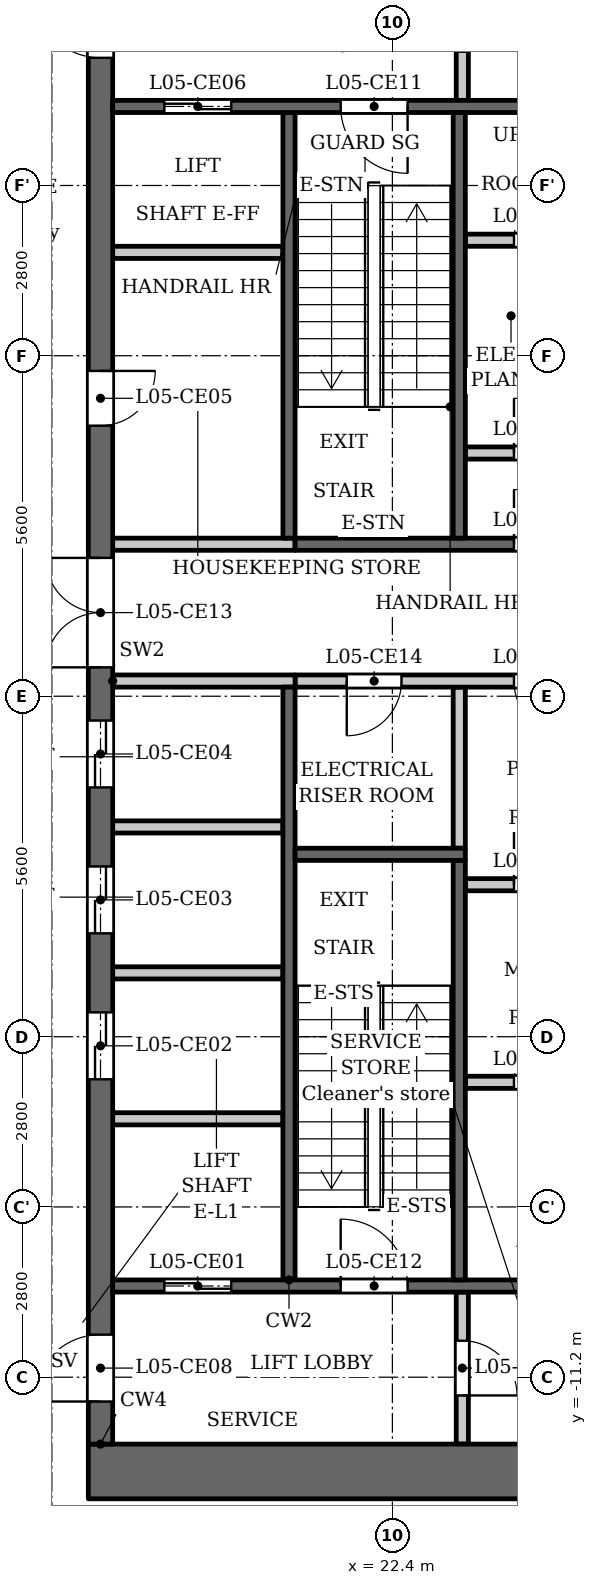
"""IFC4 building model, lengths in metres.
Left out: names, types, materials, properties, quantities, classifications, styles, units other than length and angle.
Written with IfcOpenShell. Run it as: python <this file> out.ifc"""

import sys

from ifc_helpers import new_model, si_unit, direction, frame, frame_2d, origin, place, context, subcontext, project, spatial, rectangle, extrude, element, fill, save


model = new_model("IFC4")
c1 = context("Model", 3, precision=1e-05, world=origin(), true_north=direction((0.0, 1.0)))
c2 = subcontext(c1, "Body", "Model", "MODEL_VIEW")
j1 = project(units=[si_unit("LENGTHUNIT", "METRE"), si_unit("PLANEANGLEUNIT", "RADIAN")], contexts=[c1])
p1 = place(None, origin())
s1 = spatial("IfcSite", under=j1, at=p1, CompositionType="ELEMENT")
p2 = place(p1, origin())
s2 = spatial("IfcBuilding", under=s1, at=p2, CompositionType="ELEMENT")
p3 = place(p2, frame((0.0, 0.0, 25.7)))
s3 = spatial("IfcBuildingStorey", under=s2, at=p3, CompositionType="ELEMENT", Elevation=25.7)
p4 = place(p3, frame((23.5, -2.5, 0.0), z_axis=(0.0, 0.0, 1.0), x_axis=(0.0, 1.0, 0.0)))
e1 = element("IfcWall", 1, at=p4, inside=s3, PredefinedType="PARTITIONING", context=c2, shape_type="SweptSolid", body=[
    extrude(rectangle(XDim=2.65, YDim=0.2, at=frame_2d((1.325, 0.0))), origin(), (0.0, 0.0, 1.0), 4.45),
])
p5 = place(p3, frame((20.7, 2.6, 0.0), z_axis=(0.0, 0.0, 1.0), x_axis=(0.0, 1.0, 0.0)))
e2 = element("IfcWall", 2, at=p5, inside=s3, PredefinedType="SHEAR", context=c2, shape_type="SweptSolid", body=[
    extrude(rectangle(XDim=7.0, YDim=0.2, at=frame_2d((3.5, 0.0))), origin(), (0.0, 0.0, 1.0), 4.45),
])
p6 = place(p3, frame((20.7, -9.6, 0.0), z_axis=(0.0, 0.0, 1.0), x_axis=(0.0, 1.0, 0.0)))
e3 = element("IfcWall", 3, at=p6, inside=s3, PredefinedType="SHEAR", context=c2, shape_type="SweptSolid", body=[
    extrude(rectangle(XDim=9.75, YDim=0.2, at=frame_2d((4.875, 0.0))), origin(), (0.0, 0.0, 1.0), 4.45),
])
p7 = place(p3, frame((20.8, 2.5, 0.0), z_axis=(0.0, 0.0, 1.0), x_axis=(1.0, 0.0, 0.0)))
e4 = element("IfcWall", 4, at=p7, inside=s3, PredefinedType="SHEAR", context=c2, shape_type="SweptSolid", body=[
    extrude(rectangle(XDim=5.3, YDim=0.2, at=frame_2d((2.65, 0.0))), origin(), (0.0, 0.0, 1.0), 4.45),
])
p8 = place(p7, frame((3.6, 0.0, 0.0)))
e5 = element("IfcOpeningElement", 5, at=p8, cuts=e4, PredefinedType="OPENING", context=c2, shape_type="SweptSolid", body=[
    extrude(rectangle(XDim=0.9, YDim=2.1, at=frame_2d((0.45, 1.05))), frame((0.0, 0.11, 0.0), z_axis=(0.0, -1.0, 0.0), x_axis=(1.0, 0.0, 0.0)), (0.0, 0.0, 1.0), 0.22),
])
p9 = place(p3, frame((20.8, 0.25, 0.0), z_axis=(0.0, 0.0, 1.0), x_axis=(1.0, 0.0, 0.0)))
e6 = element("IfcWall", 6, at=p9, inside=s3, PredefinedType="PARTITIONING", context=c2, shape_type="SweptSolid", body=[
    extrude(rectangle(XDim=5.3, YDim=0.2, at=frame_2d((2.65, 0.0))), origin(), (0.0, 0.0, 1.0), 4.45),
])
p10 = place(p9, frame((0.85, 0.0, 0.0)))
e7 = element("IfcOpeningElement", 7, at=p10, cuts=e6, PredefinedType="OPENING", context=c2, shape_type="SweptSolid", body=[
    extrude(rectangle(XDim=0.9, YDim=2.1, at=frame_2d((0.45, 1.05))), frame((0.0, 0.11, 0.0), z_axis=(0.0, -1.0, 0.0), x_axis=(1.0, 0.0, 0.0)), (0.0, 0.0, 1.0), 0.22),
])
p11 = place(p9, frame((3.6, 0.0, 0.0)))
e8 = element("IfcOpeningElement", 8, at=p11, cuts=e6, PredefinedType="OPENING", context=c2, shape_type="SweptSolid", body=[
    extrude(rectangle(XDim=0.9, YDim=2.1, at=frame_2d((0.45, 1.05))), frame((0.0, 0.11, 0.0), z_axis=(0.0, -1.0, 0.0), x_axis=(1.0, 0.0, 0.0)), (0.0, 0.0, 1.0), 0.22),
])
p12 = place(p3, frame((17.4, -12.75, 0.0), z_axis=(0.0, 0.0, 1.0), x_axis=(1.0, 0.0, 0.0)))
e9 = element("IfcWall", 9, at=p12, inside=s3, PredefinedType="SHEAR", context=c2, shape_type="SweptSolid", body=[
    extrude(rectangle(XDim=10.4, YDim=0.9, at=frame_2d((5.2, 0.0))), origin(), (0.0, 0.0, 1.0), 4.45),
])
p13 = place(p3, frame((17.6, -12.3, 0.0), z_axis=(0.0, 0.0, 1.0), x_axis=(0.0, 1.0, 0.0)))
e10 = element("IfcWall", 10, at=p13, inside=s3, PredefinedType="SHEAR", context=c2, shape_type="SweptSolid", body=[
    extrude(rectangle(XDim=24.6, YDim=0.4, at=frame_2d((12.3, 0.0))), origin(), (0.0, 0.0, 1.0), 4.45),
])
p14 = place(p13, frame((6.0, 0.0, 0.0)))
e11 = element("IfcOpeningElement", 11, at=p14, cuts=e10, PredefinedType="OPENING", context=c2, shape_type="SweptSolid", body=[
    extrude(rectangle(XDim=1.1, YDim=2.1, at=frame_2d((0.55, 1.05))), frame((0.0, 0.21, 0.0), z_axis=(0.0, -1.0, 0.0), x_axis=(1.0, 0.0, 0.0)), (0.0, 0.0, 1.0), 0.42),
])
p15 = place(p13, frame((8.4, 0.0, 0.0)))
e12 = element("IfcOpeningElement", 12, at=p15, cuts=e10, PredefinedType="OPENING", context=c2, shape_type="SweptSolid", body=[
    extrude(rectangle(XDim=1.1, YDim=2.1, at=frame_2d((0.55, 1.05))), frame((0.0, 0.21, 0.0), z_axis=(0.0, -1.0, 0.0), x_axis=(1.0, 0.0, 0.0)), (0.0, 0.0, 1.0), 0.42),
])
p16 = place(p13, frame((10.8, 0.0, 0.0)))
e13 = element("IfcOpeningElement", 13, at=p16, cuts=e10, PredefinedType="OPENING", context=c2, shape_type="SweptSolid", body=[
    extrude(rectangle(XDim=1.1, YDim=2.1, at=frame_2d((0.55, 1.05))), frame((0.0, 0.21, 0.0), z_axis=(0.0, -1.0, 0.0), x_axis=(1.0, 0.0, 0.0)), (0.0, 0.0, 1.0), 0.42),
])
p17 = place(p13, frame((16.75, 0.0, 0.0)))
e14 = element("IfcOpeningElement", 14, at=p17, cuts=e10, PredefinedType="OPENING", context=c2, shape_type="SweptSolid", body=[
    extrude(rectangle(XDim=0.9, YDim=2.1, at=frame_2d((0.45, 1.05))), frame((0.0, 0.21, 0.0), z_axis=(0.0, -1.0, 0.0), x_axis=(1.0, 0.0, 0.0)), (0.0, 0.0, 1.0), 0.42),
])
p18 = place(p13, frame((22.8, 0.0, 0.0)))
e15 = element("IfcOpeningElement", 15, at=p18, cuts=e10, PredefinedType="OPENING", context=c2, shape_type="SweptSolid", body=[
    extrude(rectangle(XDim=1.1, YDim=2.1, at=frame_2d((0.55, 1.05))), frame((0.0, 0.21, 0.0), z_axis=(0.0, -1.0, 0.0), x_axis=(1.0, 0.0, 0.0)), (0.0, 0.0, 1.0), 0.42),
])
p19 = place(p13, frame((0.7, 0.0, 0.0)))
e16 = element("IfcOpeningElement", 16, at=p19, cuts=e10, PredefinedType="OPENING", context=c2, shape_type="SweptSolid", body=[
    extrude(rectangle(XDim=1.1, YDim=2.1, at=frame_2d((0.55, 1.05))), frame((0.0, 0.21, 0.0), z_axis=(0.0, -1.0, 0.0), x_axis=(1.0, 0.0, 0.0)), (0.0, 0.0, 1.0), 0.42),
])
p20 = place(p13, frame((12.775, 0.0, 0.0)))
e17 = element("IfcOpeningElement", 17, at=p20, cuts=e10, PredefinedType="OPENING", context=c2, shape_type="SweptSolid", body=[
    extrude(rectangle(XDim=1.8, YDim=2.1, at=frame_2d((0.9, 1.05))), frame((0.0, 0.21, 0.0), z_axis=(0.0, -1.0, 0.0), x_axis=(1.0, 0.0, 0.0)), (0.0, 0.0, 1.0), 0.42),
])
p21 = place(p3, frame((23.55, 9.8, 0.0), z_axis=(0.0, 0.0, 1.0), x_axis=(0.0, 1.0, 0.0)))
e18 = element("IfcWall", 18, at=p21, inside=s3, PredefinedType="PARTITIONING", context=c2, shape_type="SweptSolid", body=[
    extrude(rectangle(XDim=2.5, YDim=0.2, at=frame_2d((1.25, 0.0))), origin(), (0.0, 0.0, 1.0), 4.45),
])
p22 = place(p21, frame((0.8, 0.0, 0.0)))
e19 = element("IfcOpeningElement", 19, at=p22, cuts=e18, PredefinedType="OPENING", context=c2, shape_type="SweptSolid", body=[
    extrude(rectangle(XDim=0.9, YDim=2.1, at=frame_2d((0.45, 1.05))), frame((0.0, 0.11, 0.0), z_axis=(0.0, -1.0, 0.0), x_axis=(1.0, 0.0, 0.0)), (0.0, 0.0, 1.0), 0.22),
])
p23 = place(p3, frame((23.55, -12.3, 0.0), z_axis=(0.0, 0.0, 1.0), x_axis=(0.0, 1.0, 0.0)))
e20 = element("IfcWall", 20, at=p23, inside=s3, PredefinedType="PARTITIONING", context=c2, shape_type="SweptSolid", body=[
    extrude(rectangle(XDim=2.5, YDim=0.2, at=frame_2d((1.25, 0.0))), origin(), (0.0, 0.0, 1.0), 4.45),
])
p24 = place(p23, frame((0.8, 0.0, 0.0)))
e21 = element("IfcOpeningElement", 21, at=p24, cuts=e20, PredefinedType="OPENING", context=c2, shape_type="SweptSolid", body=[
    extrude(rectangle(XDim=0.9, YDim=2.1, at=frame_2d((0.45, 1.05))), frame((0.0, 0.11, 0.0), z_axis=(0.0, -1.0, 0.0), x_axis=(1.0, 0.0, 0.0)), (0.0, 0.0, 1.0), 0.22),
])
p25 = place(p3, frame((23.6, -6.35, 0.0), z_axis=(0.0, 0.0, 1.0), x_axis=(1.0, 0.0, 0.0)))
e22 = element("IfcWall", 22, at=p25, inside=s3, PredefinedType="PARTITIONING", context=c2, shape_type="SweptSolid", body=[
    extrude(rectangle(XDim=2.5, YDim=0.2, at=frame_2d((1.25, 0.0))), origin(), (0.0, 0.0, 1.0), 4.45),
])
p26 = place(p25, frame((0.8, 0.0, 0.0)))
e23 = element("IfcOpeningElement", 23, at=p26, cuts=e22, PredefinedType="OPENING", context=c2, shape_type="SweptSolid", body=[
    extrude(rectangle(XDim=0.9, YDim=2.1, at=frame_2d((0.45, 1.05))), frame((0.0, 0.11, 0.0), z_axis=(0.0, -1.0, 0.0), x_axis=(1.0, 0.0, 0.0)), (0.0, 0.0, 1.0), 0.22),
])
p27 = place(p3, frame((23.6, -3.1, 0.0), z_axis=(0.0, 0.0, 1.0), x_axis=(1.0, 0.0, 0.0)))
e24 = element("IfcWall", 24, at=p27, inside=s3, PredefinedType="PARTITIONING", context=c2, shape_type="SweptSolid", body=[
    extrude(rectangle(XDim=2.5, YDim=0.2, at=frame_2d((1.25, 0.0))), origin(), (0.0, 0.0, 1.0), 4.45),
])
p28 = place(p27, frame((0.8, 0.0, 0.0)))
e25 = element("IfcOpeningElement", 25, at=p28, cuts=e24, PredefinedType="OPENING", context=c2, shape_type="SweptSolid", body=[
    extrude(rectangle(XDim=0.9, YDim=2.1, at=frame_2d((0.45, 1.05))), frame((0.0, 0.11, 0.0), z_axis=(0.0, -1.0, 0.0), x_axis=(1.0, 0.0, 0.0)), (0.0, 0.0, 1.0), 0.22),
])
p29 = place(p3, frame((23.6, 4.0, 0.0), z_axis=(0.0, 0.0, 1.0), x_axis=(1.0, 0.0, 0.0)))
e26 = element("IfcWall", 26, at=p29, inside=s3, PredefinedType="PARTITIONING", context=c2, shape_type="SweptSolid", body=[
    extrude(rectangle(XDim=2.5, YDim=0.2, at=frame_2d((1.25, 0.0))), origin(), (0.0, 0.0, 1.0), 4.45),
])
p30 = place(p29, frame((0.8, 0.0, 0.0)))
e27 = element("IfcOpeningElement", 27, at=p30, cuts=e26, PredefinedType="OPENING", context=c2, shape_type="SweptSolid", body=[
    extrude(rectangle(XDim=0.9, YDim=2.1, at=frame_2d((0.45, 1.05))), frame((0.0, 0.11, 0.0), z_axis=(0.0, -1.0, 0.0), x_axis=(1.0, 0.0, 0.0)), (0.0, 0.0, 1.0), 0.22),
])
p31 = place(p3, frame((23.6, 7.5, 0.0), z_axis=(0.0, 0.0, 1.0), x_axis=(1.0, 0.0, 0.0)))
e28 = element("IfcWall", 28, at=p31, inside=s3, PredefinedType="PARTITIONING", context=c2, shape_type="SweptSolid", body=[
    extrude(rectangle(XDim=2.5, YDim=0.2, at=frame_2d((1.25, 0.0))), origin(), (0.0, 0.0, 1.0), 4.45),
])
p32 = place(p31, frame((0.8, 0.0, 0.0)))
e29 = element("IfcOpeningElement", 29, at=p32, cuts=e28, PredefinedType="OPENING", context=c2, shape_type="SweptSolid", body=[
    extrude(rectangle(XDim=0.9, YDim=2.1, at=frame_2d((0.45, 1.05))), frame((0.0, 0.11, 0.0), z_axis=(0.0, -1.0, 0.0), x_axis=(1.0, 0.0, 0.0)), (0.0, 0.0, 1.0), 0.22),
])
p33 = place(p3, frame((17.8, -9.7, 0.0), z_axis=(0.0, 0.0, 1.0), x_axis=(1.0, 0.0, 0.0)))
e30 = element("IfcWall", 30, at=p33, inside=s3, PredefinedType="SHEAR", context=c2, shape_type="SweptSolid", body=[
    extrude(rectangle(XDim=8.3, YDim=0.2, at=frame_2d((4.15, 0.0))), origin(), (0.0, 0.0, 1.0), 4.45),
])
p34 = place(p33, frame((0.85, 0.0, 0.0)))
e31 = element("IfcOpeningElement", 31, at=p34, cuts=e30, PredefinedType="OPENING", context=c2, shape_type="SweptSolid", body=[
    extrude(rectangle(XDim=1.1, YDim=2.1, at=frame_2d((0.55, 1.05))), frame((0.0, 0.11, 0.0), z_axis=(0.0, -1.0, 0.0), x_axis=(1.0, 0.0, 0.0)), (0.0, 0.0, 1.0), 0.22),
])
p35 = place(p33, frame((3.75, 0.0, 0.0)))
e32 = element("IfcOpeningElement", 32, at=p35, cuts=e30, PredefinedType="OPENING", context=c2, shape_type="SweptSolid", body=[
    extrude(rectangle(XDim=1.1, YDim=2.1, at=frame_2d((0.55, 1.05))), frame((0.0, 0.11, 0.0), z_axis=(0.0, -1.0, 0.0), x_axis=(1.0, 0.0, 0.0)), (0.0, 0.0, 1.0), 0.22),
])
for number, where, z_axis, x_axis in (
    (33, (17.8, -6.95, 0.0), (0.0, 0.0, 1.0), (1.0, 0.0, 0.0)),
    (34, (17.8, -4.55, 0.0), (0.0, 0.0, 1.0), (1.0, 0.0, 0.0)),
    (35, (17.8, -2.15, 0.0), (0.0, 0.0, 1.0), (1.0, 0.0, 0.0)),
):
    element("IfcWall", number, at=place(p3, frame(where, z_axis=z_axis, x_axis=x_axis)), inside=s3, PredefinedType="PARTITIONING", context=c2, shape_type="SweptSolid", body=[
        extrude(rectangle(XDim=2.8, YDim=0.2, at=frame_2d((1.4, 0.0))), origin(), (0.0, 0.0, 1.0), 4.45),
    ])
for number, where, z_axis, x_axis in (
    (36, (17.8, 0.25, 0.0), (0.0, 0.0, 1.0), (1.0, 0.0, 0.0)),
    (37, (17.8, 2.5, 0.0), (0.0, 0.0, 1.0), (1.0, 0.0, 0.0)),
):
    element("IfcWall", number, at=place(p3, frame(where, z_axis=z_axis, x_axis=x_axis)), inside=s3, PredefinedType="PARTITIONING", context=c2, shape_type="SweptSolid", body=[
        extrude(rectangle(XDim=3.0, YDim=0.2, at=frame_2d((1.5, 0.0))), origin(), (0.0, 0.0, 1.0), 4.45),
    ])
p36 = place(p3, frame((17.8, 7.3, 0.0), z_axis=(0.0, 0.0, 1.0), x_axis=(1.0, 0.0, 0.0)))
e38 = element("IfcWall", 38, at=p36, inside=s3, PredefinedType="PARTITIONING", context=c2, shape_type="SweptSolid", body=[
    extrude(rectangle(XDim=2.8, YDim=0.2, at=frame_2d((1.4, 0.0))), origin(), (0.0, 0.0, 1.0), 4.45),
])
p37 = place(p3, frame((17.8, 9.7, 0.0), z_axis=(0.0, 0.0, 1.0), x_axis=(1.0, 0.0, 0.0)))
e39 = element("IfcWall", 39, at=p37, inside=s3, PredefinedType="SHEAR", context=c2, shape_type="SweptSolid", body=[
    extrude(rectangle(XDim=8.3, YDim=0.2, at=frame_2d((4.15, 0.0))), origin(), (0.0, 0.0, 1.0), 4.45),
])
p38 = place(p37, frame((0.85, 0.0, 0.0)))
e40 = element("IfcOpeningElement", 40, at=p38, cuts=e39, PredefinedType="OPENING", context=c2, shape_type="SweptSolid", body=[
    extrude(rectangle(XDim=1.1, YDim=2.1, at=frame_2d((0.55, 1.05))), frame((0.0, 0.11, 0.0), z_axis=(0.0, -1.0, 0.0), x_axis=(1.0, 0.0, 0.0)), (0.0, 0.0, 1.0), 0.22),
])
p39 = place(p37, frame((3.75, 0.0, 0.0)))
e41 = element("IfcOpeningElement", 41, at=p39, cuts=e39, PredefinedType="OPENING", context=c2, shape_type="SweptSolid", body=[
    extrude(rectangle(XDim=1.1, YDim=2.1, at=frame_2d((0.55, 1.05))), frame((0.0, 0.11, 0.0), z_axis=(0.0, -1.0, 0.0), x_axis=(1.0, 0.0, 0.0)), (0.0, 0.0, 1.0), 0.22),
])
p40 = place(p3, frame((23.5, 2.6, 0.0), z_axis=(0.0, 0.0, 1.0), x_axis=(0.0, 1.0, 0.0)))
e42 = element("IfcWall", 42, at=p40, inside=s3, PredefinedType="SHEAR", context=c2, shape_type="SweptSolid", body=[
    extrude(rectangle(XDim=7.0, YDim=0.2, at=frame_2d((3.5, 0.0))), origin(), (0.0, 0.0, 1.0), 4.45),
])
p41 = place(p3, frame((23.5, -9.6, 0.0), z_axis=(0.0, 0.0, 1.0), x_axis=(0.0, 1.0, 0.0)))
e43 = element("IfcWall", 43, at=p41, inside=s3, PredefinedType="SHEAR", context=c2, shape_type="SweptSolid", body=[
    extrude(rectangle(XDim=6.9, YDim=0.2, at=frame_2d((3.45, 0.0))), origin(), (0.0, 0.0, 1.0), 4.45),
])
p42 = place(p3, frame((20.8, -2.6, 0.0), z_axis=(0.0, 0.0, 1.0), x_axis=(1.0, 0.0, 0.0)))
e44 = element("IfcWall", 44, at=p42, inside=s3, PredefinedType="SHEAR", context=c2, shape_type="SweptSolid", body=[
    extrude(rectangle(XDim=2.8, YDim=0.2, at=frame_2d((1.4, 0.0))), origin(), (0.0, 0.0, 1.0), 4.45),
])
p43 = place(p34, origin())
e45 = element("IfcDoor", 45, at=p43, inside=s3, OperationType="DOUBLE_DOOR_SLIDING", PredefinedType="DOOR", context=c2, shape_type="SweptSolid", body=[
    extrude(rectangle(XDim=1.1, YDim=2.1, at=frame_2d((0.55, 1.05))), frame((0.0, 0.025, 0.0), z_axis=(0.0, -1.0, 0.0), x_axis=(1.0, 0.0, 0.0)), (0.0, 0.0, 1.0), 0.05),
])
fill(e31, e45)
p44 = place(p14, origin())
e46 = element("IfcDoor", 46, at=p44, inside=s3, OperationType="DOUBLE_DOOR_SLIDING", PredefinedType="DOOR", context=c2, shape_type="SweptSolid", body=[
    extrude(rectangle(XDim=1.1, YDim=2.1, at=frame_2d((0.55, 1.05))), frame((0.0, 0.025, 0.0), z_axis=(0.0, -1.0, 0.0), x_axis=(1.0, 0.0, 0.0)), (0.0, 0.0, 1.0), 0.05),
])
fill(e11, e46)
p45 = place(p15, origin())
e47 = element("IfcDoor", 47, at=p45, inside=s3, OperationType="DOUBLE_DOOR_SLIDING", PredefinedType="DOOR", context=c2, shape_type="SweptSolid", body=[
    extrude(rectangle(XDim=1.1, YDim=2.1, at=frame_2d((0.55, 1.05))), frame((0.0, 0.025, 0.0), z_axis=(0.0, -1.0, 0.0), x_axis=(1.0, 0.0, 0.0)), (0.0, 0.0, 1.0), 0.05),
])
fill(e12, e47)
p46 = place(p16, origin())
e48 = element("IfcDoor", 48, at=p46, inside=s3, OperationType="DOUBLE_DOOR_SLIDING", PredefinedType="DOOR", context=c2, shape_type="SweptSolid", body=[
    extrude(rectangle(XDim=1.1, YDim=2.1, at=frame_2d((0.55, 1.05))), frame((0.0, 0.025, 0.0), z_axis=(0.0, -1.0, 0.0), x_axis=(1.0, 0.0, 0.0)), (0.0, 0.0, 1.0), 0.05),
])
fill(e13, e48)
p47 = place(p17, origin())
e49 = element("IfcDoor", 49, at=p47, inside=s3, OperationType="SINGLE_SWING_RIGHT", PredefinedType="DOOR", context=c2, shape_type="SweptSolid", body=[
    extrude(rectangle(XDim=0.9, YDim=2.1, at=frame_2d((0.45, 1.05))), frame((0.0, 0.025, 0.0), z_axis=(0.0, -1.0, 0.0), x_axis=(1.0, 0.0, 0.0)), (0.0, 0.0, 1.0), 0.05),
])
fill(e14, e49)
p48 = place(p38, origin())
e50 = element("IfcDoor", 50, at=p48, inside=s3, OperationType="DOUBLE_DOOR_SLIDING", PredefinedType="DOOR", context=c2, shape_type="SweptSolid", body=[
    extrude(rectangle(XDim=1.1, YDim=2.1, at=frame_2d((0.55, 1.05))), frame((0.0, 0.025, 0.0), z_axis=(0.0, -1.0, 0.0), x_axis=(1.0, 0.0, 0.0)), (0.0, 0.0, 1.0), 0.05),
])
fill(e40, e50)
p49 = place(p18, origin())
e51 = element("IfcDoor", 51, at=p49, inside=s3, OperationType="SINGLE_SWING_LEFT", PredefinedType="DOOR", context=c2, shape_type="SweptSolid", body=[
    extrude(rectangle(XDim=1.1, YDim=2.1, at=frame_2d((0.55, 1.05))), frame((0.0, 0.025, 0.0), z_axis=(0.0, -1.0, 0.0), x_axis=(1.0, 0.0, 0.0)), (0.0, 0.0, 1.0), 0.05),
])
fill(e15, e51)
p50 = place(p19, origin())
e52 = element("IfcDoor", 52, at=p50, inside=s3, OperationType="SINGLE_SWING_RIGHT", PredefinedType="DOOR", context=c2, shape_type="SweptSolid", body=[
    extrude(rectangle(XDim=1.1, YDim=2.1, at=frame_2d((0.55, 1.05))), frame((0.0, 0.025, 0.0), z_axis=(0.0, -1.0, 0.0), x_axis=(1.0, 0.0, 0.0)), (0.0, 0.0, 1.0), 0.05),
])
fill(e16, e52)
p51 = place(p24, origin())
e53 = element("IfcDoor", 53, at=p51, inside=s3, OperationType="SINGLE_SWING_LEFT", PredefinedType="DOOR", context=c2, shape_type="SweptSolid", body=[
    extrude(rectangle(XDim=0.9, YDim=2.1, at=frame_2d((0.45, 1.05))), frame((0.0, 0.025, 0.0), z_axis=(0.0, -1.0, 0.0), x_axis=(1.0, 0.0, 0.0)), (0.0, 0.0, 1.0), 0.05),
])
fill(e21, e53)
p52 = place(p39, origin())
e54 = element("IfcDoor", 54, at=p52, inside=s3, OperationType="SINGLE_SWING_RIGHT", PredefinedType="DOOR", context=c2, shape_type="SweptSolid", body=[
    extrude(rectangle(XDim=1.1, YDim=2.1, at=frame_2d((0.55, 1.05))), frame((0.0, 0.025, 0.0), z_axis=(0.0, -1.0, 0.0), x_axis=(1.0, 0.0, 0.0)), (0.0, 0.0, 1.0), 0.05),
])
fill(e41, e54)
p53 = place(p35, origin())
e55 = element("IfcDoor", 55, at=p53, inside=s3, OperationType="SINGLE_SWING_RIGHT", PredefinedType="DOOR", context=c2, shape_type="SweptSolid", body=[
    extrude(rectangle(XDim=1.1, YDim=2.1, at=frame_2d((0.55, 1.05))), frame((0.0, 0.025, 0.0), z_axis=(0.0, -1.0, 0.0), x_axis=(1.0, 0.0, 0.0)), (0.0, 0.0, 1.0), 0.05),
])
fill(e32, e55)
p54 = place(p20, origin())
e56 = element("IfcDoor", 56, at=p54, inside=s3, OperationType="DOUBLE_DOOR_SINGLE_SWING", PredefinedType="DOOR", context=c2, shape_type="SweptSolid", body=[
    extrude(rectangle(XDim=1.8, YDim=2.1, at=frame_2d((0.9, 1.05))), frame((0.0, 0.025, 0.0), z_axis=(0.0, -1.0, 0.0), x_axis=(1.0, 0.0, 0.0)), (0.0, 0.0, 1.0), 0.05),
])
fill(e17, e56)
p55 = place(p10, origin())
e57 = element("IfcDoor", 57, at=p55, inside=s3, OperationType="SINGLE_SWING_LEFT", PredefinedType="DOOR", context=c2, shape_type="SweptSolid", body=[
    extrude(rectangle(XDim=0.9, YDim=2.1, at=frame_2d((0.45, 1.05))), frame((0.0, 0.025, 0.0), z_axis=(0.0, -1.0, 0.0), x_axis=(1.0, 0.0, 0.0)), (0.0, 0.0, 1.0), 0.05),
])
fill(e7, e57)
p56 = place(p26, origin())
e58 = element("IfcDoor", 58, at=p56, inside=s3, OperationType="SINGLE_SWING_LEFT", PredefinedType="DOOR", context=c2, shape_type="SweptSolid", body=[
    extrude(rectangle(XDim=0.9, YDim=2.1, at=frame_2d((0.45, 1.05))), frame((0.0, 0.025, 0.0), z_axis=(0.0, -1.0, 0.0), x_axis=(1.0, 0.0, 0.0)), (0.0, 0.0, 1.0), 0.05),
])
fill(e23, e58)
p57 = place(p28, origin())
e59 = element("IfcDoor", 59, at=p57, inside=s3, OperationType="SINGLE_SWING_RIGHT", PredefinedType="DOOR", context=c2, shape_type="SweptSolid", body=[
    extrude(rectangle(XDim=0.9, YDim=2.1, at=frame_2d((0.45, 1.05))), frame((0.0, 0.025, 0.0), z_axis=(0.0, -1.0, 0.0), x_axis=(1.0, 0.0, 0.0)), (0.0, 0.0, 1.0), 0.05),
])
fill(e25, e59)
p58 = place(p11, origin())
e60 = element("IfcDoor", 60, at=p58, inside=s3, OperationType="SINGLE_SWING_RIGHT", PredefinedType="DOOR", context=c2, shape_type="SweptSolid", body=[
    extrude(rectangle(XDim=0.9, YDim=2.1, at=frame_2d((0.45, 1.05))), frame((0.0, 0.025, 0.0), z_axis=(0.0, -1.0, 0.0), x_axis=(1.0, 0.0, 0.0)), (0.0, 0.0, 1.0), 0.05),
])
fill(e8, e60)
p59 = place(p30, origin())
e61 = element("IfcDoor", 61, at=p59, inside=s3, OperationType="SINGLE_SWING_RIGHT", PredefinedType="DOOR", context=c2, shape_type="SweptSolid", body=[
    extrude(rectangle(XDim=0.9, YDim=2.1, at=frame_2d((0.45, 1.05))), frame((0.0, 0.025, 0.0), z_axis=(0.0, -1.0, 0.0), x_axis=(1.0, 0.0, 0.0)), (0.0, 0.0, 1.0), 0.05),
])
fill(e27, e61)
p60 = place(p32, origin())
e62 = element("IfcDoor", 62, at=p60, inside=s3, OperationType="SINGLE_SWING_LEFT", PredefinedType="DOOR", context=c2, shape_type="SweptSolid", body=[
    extrude(rectangle(XDim=0.9, YDim=2.1, at=frame_2d((0.45, 1.05))), frame((0.0, 0.025, 0.0), z_axis=(0.0, -1.0, 0.0), x_axis=(1.0, 0.0, 0.0)), (0.0, 0.0, 1.0), 0.05),
])
fill(e29, e62)
p61 = place(p8, origin())
e63 = element("IfcDoor", 63, at=p61, inside=s3, OperationType="SINGLE_SWING_RIGHT", PredefinedType="DOOR", context=c2, shape_type="SweptSolid", body=[
    extrude(rectangle(XDim=0.9, YDim=2.1, at=frame_2d((0.45, 1.05))), frame((0.0, 0.025, 0.0), z_axis=(0.0, -1.0, 0.0), x_axis=(1.0, 0.0, 0.0)), (0.0, 0.0, 1.0), 0.05),
])
fill(e5, e63)
save(model, sys.argv[1])
